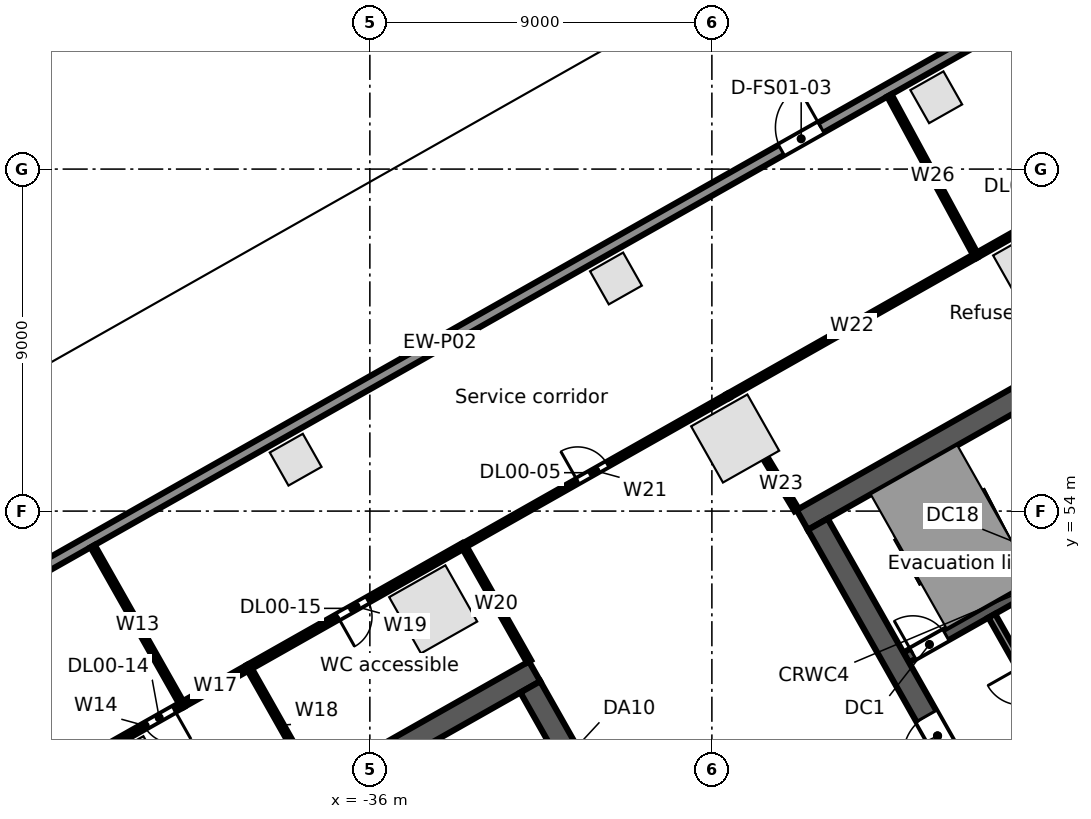
"""IFC4 building model, lengths in metres.
Left out: names, types, materials, properties, quantities, classifications, styles, units other than length and angle.
Written with IfcOpenShell. Run it as: python <this file> out.ifc"""

import sys

from ifc_helpers import new_model, si_unit, direction, frame, frame_2d, origin, origin_2d, place, context, subcontext, project, spatial, rectangle, extrude, element, fill, save


model = new_model("IFC4")
c1 = context("Model", 3, precision=1e-05, world=origin(), true_north=direction((0.0, 1.0)))
c2 = subcontext(c1, "Body", "Model", "MODEL_VIEW")
j1 = project(units=[si_unit("LENGTHUNIT", "METRE"), si_unit("PLANEANGLEUNIT", "RADIAN")], contexts=[c1])
p1 = place(None, origin())
s1 = spatial("IfcSite", under=j1, at=p1, CompositionType="ELEMENT")
p2 = place(p1, origin())
s2 = spatial("IfcBuilding", under=s1, at=p2, CompositionType="ELEMENT")
p3 = place(p2, origin())
s3 = spatial("IfcBuildingStorey", under=s2, at=p3, CompositionType="ELEMENT", Elevation=0.0)
for number, where, z_axis, x_axis in (
    (1, (-18.441, 60.406, 0.0), (0.0, 0.0, 1.0), (-0.87, -0.492, 0.0)),
    (2, (-26.388, 55.91, 0.0), (0.0, 0.0, 1.0), (-0.87, -0.492, 0.0)),
    (3, (-34.334, 51.414, 0.0), (0.0, 0.0, 1.0), (-0.87, -0.492, 0.0)),
    (4, (-42.28, 46.919, 0.0), (0.0, 0.0, 1.0), (-0.87, -0.492, 0.0)),
):
    element("IfcColumn", number, at=place(p3, frame(where, z_axis=z_axis, x_axis=x_axis)), inside=s3, PredefinedType="COLUMN", context=c2, shape_type="SweptSolid", body=[
        extrude(rectangle(XDim=1.7, YDim=1.7, at=origin_2d()), origin(), (0.0, 0.0, 1.0), 6.5),
    ])
for number, where, z_axis, x_axis in (
    (5, (-21.096, 64.89, 0.0), (0.0, 0.0, 1.0), (-0.87, -0.492, 0.0)),
    (6, (-29.524, 60.122, 0.0), (0.0, 0.0, 1.0), (-0.87, -0.492, 0.0)),
    (7, (-37.953, 55.353, 0.0), (0.0, 0.0, 1.0), (-0.87, -0.492, 0.0)),
):
    element("IfcColumn", number, at=place(p3, frame(where, z_axis=z_axis, x_axis=x_axis)), inside=s3, PredefinedType="COLUMN", context=c2, shape_type="SweptSolid", body=[
        extrude(rectangle(XDim=1.0, YDim=1.0, at=origin_2d()), origin(), (0.0, 0.0, 1.0), 6.5),
    ])
p4 = place(p3, frame((-63.707, 41.701, 0.0), z_axis=(0.0, 0.0, 1.0), x_axis=(0.870355510268, 0.492423888277, 0.0)))
e8 = element("IfcWall", 8, at=p4, inside=s3, PredefinedType="STANDARD", context=c2, shape_type="SweptSolid", body=[
    extrude(rectangle(XDim=67.903, YDim=0.3, at=frame_2d((33.952, 0.0))), origin(), (0.0, 0.0, 1.0), 6.15),
])
p5 = place(p4, frame((44.274, 0.0, 0.0)))
e9 = element("IfcOpeningElement", 9, at=p5, cuts=e8, PredefinedType="OPENING", context=c2, shape_type="SweptSolid", body=[
    extrude(rectangle(XDim=1.2, YDim=2.4, at=frame_2d((0.6, 1.2))), frame((0.0, 0.16, 0.0), z_axis=(0.0, -1.0, 0.0), x_axis=(1.0, 0.0, 0.0)), (0.0, 0.0, 1.0), 0.32),
])
p6 = place(p4, frame((15.222, 0.0, 0.0)))
e10 = element("IfcOpeningElement", 10, at=p6, cuts=e8, PredefinedType="OPENING", context=c2, shape_type="SweptSolid", body=[
    extrude(rectangle(XDim=1.2, YDim=2.4, at=frame_2d((0.6, 1.2))), frame((0.0, 0.16, 0.0), z_axis=(0.0, -1.0, 0.0), x_axis=(1.0, 0.0, 0.0)), (0.0, 0.0, 1.0), 0.32),
])
p7 = place(p3, frame((-46.461, 41.412, 0.0), z_axis=(0.0, 0.0, 1.0), x_axis=(0.870350116061, 0.492433422375, 0.0)))
e11 = element("IfcWall", 11, at=p7, inside=s3, PredefinedType="SOLIDWALL", context=c2, shape_type="SweptSolid", body=[
    extrude(rectangle(XDim=17.0, YDim=0.6, at=frame_2d((8.5, 0.0))), origin(), (0.0, 0.0, 1.0), 6.15),
])
p8 = place(p3, frame((-31.778, 49.374, 0.0), z_axis=(0.0, 0.0, 1.0), x_axis=(0.492433046652, -0.870350328641, 0.0)))
e12 = element("IfcWall", 12, at=p8, inside=s3, PredefinedType="SOLIDWALL", context=c2, shape_type="SweptSolid", body=[
    extrude(rectangle(XDim=12.8, YDim=0.6, at=frame_2d((6.4, 0.0))), origin(), (0.0, 0.0, 1.0), 6.15),
])
p9 = place(p8, frame((5.8, 0.0, 0.0)))
e13 = element("IfcOpeningElement", 13, at=p9, cuts=e12, PredefinedType="OPENING", context=c2, shape_type="SweptSolid", body=[
    extrude(rectangle(XDim=1.2, YDim=2.1, at=frame_2d((0.6, 1.05))), frame((0.0, 0.31, 0.0), z_axis=(0.0, -1.0, 0.0), x_axis=(1.0, 0.0, 0.0)), (0.0, 0.0, 1.0), 0.62),
])
p10 = place(p3, frame((-19.718, 46.316, 0.0), z_axis=(0.0, 0.0, 1.0), x_axis=(0.870353963862, 0.492426621528, 0.0)))
e14 = element("IfcWall", 14, at=p10, inside=s3, PredefinedType="SOLIDWALL", context=c2, shape_type="SweptSolid", body=[
    extrude(rectangle(XDim=4.9, YDim=0.3, at=frame_2d((2.45, 0.0))), origin(), (0.0, 0.0, 1.0), 6.15),
])
p11 = place(p10, frame((0.55, 0.0, 0.0)))
e15 = element("IfcOpeningElement", 15, at=p11, cuts=e14, PredefinedType="OPENING", context=c2, shape_type="SweptSolid", body=[
    extrude(rectangle(XDim=1.1, YDim=2.1, at=frame_2d((0.55, 1.05))), frame((0.0, 0.16, 0.0), z_axis=(0.0, -1.0, 0.0), x_axis=(1.0, 0.0, 0.0)), (0.0, 0.0, 1.0), 0.32),
])
p12 = place(p10, frame((2.85, 0.0, 0.0)))
e16 = element("IfcOpeningElement", 16, at=p12, cuts=e14, PredefinedType="OPENING", context=c2, shape_type="SweptSolid", body=[
    extrude(rectangle(XDim=0.9, YDim=2.1, at=frame_2d((0.45, 1.05))), frame((0.0, 0.16, 0.0), z_axis=(0.0, -1.0, 0.0), x_axis=(1.0, 0.0, 0.0)), (0.0, 0.0, 1.0), 0.32),
])
p13 = place(p3, frame((-21.885, 50.146, 0.0), z_axis=(0.0, 0.0, 1.0), x_axis=(0.870359411463, 0.492416992881, 0.0)))
e17 = element("IfcWall", 17, at=p13, inside=s3, PredefinedType="SOLIDWALL", context=c2, shape_type="SweptSolid", body=[
    extrude(rectangle(XDim=7.2, YDim=0.3, at=frame_2d((3.6, 0.0))), origin(), (0.0, 0.0, 1.0), 6.15),
])
p14 = place(p13, frame((0.2, 0.0, 0.0)))
e18 = element("IfcOpeningElement", 18, at=p14, cuts=e17, PredefinedType="OPENING", context=c2, shape_type="SweptSolid", body=[
    extrude(rectangle(XDim=1.0, YDim=2.1, at=frame_2d((0.5, 1.05))), frame((0.0, 0.16, 0.0), z_axis=(0.0, -1.0, 0.0), x_axis=(1.0, 0.0, 0.0)), (0.0, 0.0, 1.0), 0.32),
])
p15 = place(p3, frame((-24.623, 53.767, 0.0), z_axis=(0.0, 0.0, 1.0), x_axis=(0.870356627484, 0.492421913601, 0.0)))
e19 = element("IfcWall", 19, at=p15, inside=s3, PredefinedType="SOLIDWALL", context=c2, shape_type="SweptSolid", body=[
    extrude(rectangle(XDim=15.0, YDim=0.6, at=frame_2d((7.5, 0.0))), origin(), (0.0, 0.0, 1.0), 6.15),
])
p16 = place(p3, frame((-24.214, 53.654, 0.0), z_axis=(0.0, 0.0, 1.0), x_axis=(0.492441221355, -0.870345703448, 0.0)))
e20 = element("IfcWall", 20, at=p16, inside=s3, PredefinedType="SOLIDWALL", context=c2, shape_type="SweptSolid", body=[
    extrude(rectangle(XDim=12.8, YDim=0.6, at=frame_2d((6.4, 0.0))), origin(), (0.0, 0.0, 1.0), 6.15),
])
p17 = place(p16, frame((5.8, 0.0, 0.0)))
e21 = element("IfcOpeningElement", 21, at=p17, cuts=e20, PredefinedType="OPENING", context=c2, shape_type="SweptSolid", body=[
    extrude(rectangle(XDim=1.2, YDim=2.1, at=frame_2d((0.6, 1.05))), frame((0.0, 0.31, 0.0), z_axis=(0.0, -1.0, 0.0), x_axis=(1.0, 0.0, 0.0)), (0.0, 0.0, 1.0), 0.62),
])
p18 = place(p3, frame((-19.635, 51.246, 0.0), z_axis=(0.0, 0.0, 1.0), x_axis=(0.492408451753, -0.87036424366, 0.0)))
e22 = element("IfcWall", 22, at=p18, inside=s3, PredefinedType="PARTITIONING", context=c2, shape_type="SweptSolid", body=[
    extrude(rectangle(XDim=4.1, YDim=0.2, at=frame_2d((2.05, 0.0))), origin(), (0.0, 0.0, 1.0), 6.15),
])
p19 = place(p18, frame((1.55, 0.0, 0.0)))
e23 = element("IfcOpeningElement", 23, at=p19, cuts=e22, PredefinedType="OPENING", context=c2, shape_type="SweptSolid", body=[
    extrude(rectangle(XDim=1.0, YDim=2.1, at=frame_2d((0.5, 1.05))), frame((0.0, 0.11, 0.0), z_axis=(0.0, -1.0, 0.0), x_axis=(1.0, 0.0, 0.0)), (0.0, 0.0, 1.0), 0.22),
])
p20 = place(p3, frame((-43.295, 53.077, 0.0), z_axis=(0.0, 0.0, 1.0), x_axis=(0.492503605136, -0.87031040378, 0.0)))
e24 = element("IfcWall", 24, at=p20, inside=s3, PredefinedType="PARTITIONING", context=c2, shape_type="SweptSolid", body=[
    extrude(rectangle(XDim=4.793, YDim=0.125, at=frame_2d((2.397, 0.0))), origin(), (0.0, 0.0, 1.0), 5.43),
])
p21 = place(p3, frame((-42.892, 47.797, 0.0), z_axis=(0.0, 0.0, 1.0), x_axis=(0.870332332106, 0.492464853254, 0.0)))
e25 = element("IfcWall", 25, at=p21, inside=s3, PredefinedType="PARTITIONING", context=c2, shape_type="SweptSolid", body=[
    extrude(rectangle(XDim=2.25, YDim=0.15, at=frame_2d((1.125, 0.0))), origin(), (0.0, 0.0, 1.0), 6.15),
])
p22 = place(p21, frame((1.1, 0.0, 0.0)))
e26 = element("IfcOpeningElement", 26, at=p22, cuts=e25, PredefinedType="OPENING", context=c2, shape_type="SweptSolid", body=[
    extrude(rectangle(XDim=0.9, YDim=2.1, at=frame_2d((0.45, 1.05))), frame((0.0, 0.085, 0.0), z_axis=(0.0, -1.0, 0.0), x_axis=(1.0, 0.0, 0.0)), (0.0, 0.0, 1.0), 0.17),
])
p23 = place(p3, frame((-40.934, 48.905, 0.0), z_axis=(0.0, 0.0, 1.0), x_axis=(0.870592396556, 0.492004958368, 0.0)))
e27 = element("IfcWall", 27, at=p23, inside=s3, PredefinedType="PARTITIONING", context=c2, shape_type="SweptSolid", body=[
    extrude(rectangle(XDim=2.0, YDim=0.15, at=frame_2d((1.0, 0.0))), origin(), (0.0, 0.0, 1.0), 6.15),
])
p24 = place(p3, frame((-39.193, 49.889, 0.0), z_axis=(0.0, 0.0, 1.0), x_axis=(0.492392845909, -0.87037307248, 0.0)))
e28 = element("IfcWall", 28, at=p24, inside=s3, PredefinedType="PARTITIONING", context=c2, shape_type="SweptSolid", body=[
    extrude(rectangle(XDim=3.5, YDim=0.125, at=frame_2d((1.75, 0.0))), origin(), (0.0, 0.0, 1.0), 5.43),
])
p25 = place(p3, frame((-39.193, 49.889, 0.0), z_axis=(0.0, 0.0, 1.0), x_axis=(0.870324897112, 0.492477992876, 0.0)))
e29 = element("IfcWall", 29, at=p25, inside=s3, PredefinedType="PARTITIONING", context=c2, shape_type="SweptSolid", body=[
    extrude(rectangle(XDim=6.5, YDim=0.15, at=frame_2d((3.25, 0.0))), origin(), (0.0, 0.0, 1.0), 5.53),
])
p26 = place(p25, frame((2.7, 0.0, 0.0)))
e30 = element("IfcOpeningElement", 30, at=p26, cuts=e29, PredefinedType="OPENING", context=c2, shape_type="SweptSolid", body=[
    extrude(rectangle(XDim=0.9, YDim=2.1, at=frame_2d((0.45, 1.05))), frame((0.0, 0.085, 0.0), z_axis=(0.0, -1.0, 0.0), x_axis=(1.0, 0.0, 0.0)), (0.0, 0.0, 1.0), 0.17),
])
p27 = place(p3, frame((-33.536, 53.09, 0.0), z_axis=(0.0, 0.0, 1.0), x_axis=(0.492521469645, -0.870300294116, 0.0)))
e31 = element("IfcWall", 31, at=p27, inside=s3, PredefinedType="PARTITIONING", context=c2, shape_type="SweptSolid", body=[
    extrude(rectangle(XDim=3.5, YDim=0.125, at=frame_2d((1.75, 0.0))), origin(), (0.0, 0.0, 1.0), 5.43),
])
p28 = place(p3, frame((-33.536, 53.09, 0.0), z_axis=(0.0, 0.0, 1.0), x_axis=(0.870327439455, 0.492473499928, 0.0)))
e32 = element("IfcWall", 32, at=p28, inside=s3, PredefinedType="PARTITIONING", context=c2, shape_type="SweptSolid", body=[
    extrude(rectangle(XDim=8.0, YDim=0.125, at=frame_2d((4.0, 0.0))), origin(), (0.0, 0.0, 1.0), 5.212),
])
p29 = place(p28, frame((3.45, 0.0, 0.0)))
e33 = element("IfcOpeningElement", 33, at=p29, cuts=e32, PredefinedType="OPENING", context=c2, shape_type="SweptSolid", body=[
    extrude(rectangle(XDim=0.9, YDim=2.1, at=frame_2d((0.45, 1.05))), frame((0.0, 0.073, 0.0), z_axis=(0.0, -1.0, 0.0), x_axis=(1.0, 0.0, 0.0)), (0.0, 0.0, 1.0), 0.145),
])
p30 = place(p3, frame((-26.573, 57.03, 0.0), z_axis=(0.0, 0.0, 1.0), x_axis=(0.870354792164, 0.492425157519, 0.0)))
e34 = element("IfcWall", 34, at=p30, inside=s3, PredefinedType="PARTITIONING", context=c2, shape_type="SweptSolid", body=[
    extrude(rectangle(XDim=7.499, YDim=0.125, at=frame_2d((3.75, 0.0))), origin(), (0.0, 0.0, 1.0), 6.15),
])
p31 = place(p3, frame((-25.587, 55.387, 0.0), z_axis=(0.0, 0.0, 1.0), x_axis=(0.514767546849, -0.857329792268, 0.0)))
e35 = element("IfcWall", 35, at=p31, inside=s3, PredefinedType="PARTITIONING", context=c2, shape_type="SweptSolid", body=[
    extrude(rectangle(XDim=1.585, YDim=0.125, at=frame_2d((0.792, 0.0))), origin(), (0.0, 0.0, 1.0), 6.15),
])
p32 = place(p3, frame((-22.33, 64.939, 0.0), z_axis=(0.0, 0.0, 1.0), x_axis=(0.476360236723, -0.879250206067, 0.0)))
e36 = element("IfcWall", 36, at=p32, inside=s3, PredefinedType="PARTITIONING", context=c2, shape_type="SweptSolid", body=[
    extrude(rectangle(XDim=4.795, YDim=0.125, at=frame_2d((2.397, 0.0))), origin(), (0.0, 0.0, 1.0), 5.43),
])
p33 = place(p3, frame((-20.046, 60.723, 0.0), z_axis=(0.0, 0.0, 1.0), x_axis=(0.870364520461, 0.492407962489, 0.0)))
e37 = element("IfcWall", 37, at=p33, inside=s3, PredefinedType="PARTITIONING", context=c2, shape_type="SweptSolid", body=[
    extrude(rectangle(XDim=7.5, YDim=0.125, at=frame_2d((3.75, 0.0))), origin(), (0.0, 0.0, 1.0), 5.43),
])
p34 = place(p33, frame((3.2, 0.0, 0.0)))
e38 = element("IfcOpeningElement", 38, at=p34, cuts=e37, PredefinedType="OPENING", context=c2, shape_type="SweptSolid", body=[
    extrude(rectangle(XDim=0.9, YDim=2.1, at=frame_2d((0.45, 1.05))), frame((0.0, 0.073, 0.0), z_axis=(0.0, -1.0, 0.0), x_axis=(1.0, 0.0, 0.0)), (0.0, 0.0, 1.0), 0.145),
])
p35 = place(p5, origin())
e39 = element("IfcDoor", 39, at=p35, inside=s3, OperationType="SINGLE_SWING_RIGHT", PredefinedType="DOOR", context=c2, shape_type="SweptSolid", body=[
    extrude(rectangle(XDim=1.2, YDim=2.4, at=frame_2d((0.6, 1.2))), frame((0.0, 0.025, 0.0), z_axis=(0.0, -1.0, 0.0), x_axis=(1.0, 0.0, 0.0)), (0.0, 0.0, 1.0), 0.05),
])
fill(e9, e39)
p36 = place(p14, origin())
e40 = element("IfcDoor", 40, at=p36, inside=s3, OperationType="SINGLE_SWING_LEFT", PredefinedType="DOOR", context=c2, shape_type="SweptSolid", body=[
    extrude(rectangle(XDim=1.0, YDim=2.1, at=frame_2d((0.5, 1.05))), frame((0.0, 0.025, 0.0), z_axis=(0.0, -1.0, 0.0), x_axis=(1.0, 0.0, 0.0)), (0.0, 0.0, 1.0), 0.05),
])
fill(e18, e40)
p37 = place(p17, frame((1.2, 0.0, 0.0), z_axis=(0.0, 0.0, 1.0), x_axis=(-1.0, 0.0, 0.0)))
e41 = element("IfcDoor", 41, at=p37, inside=s3, OperationType="SINGLE_SWING_LEFT", PredefinedType="DOOR", context=c2, shape_type="SweptSolid", body=[
    extrude(rectangle(XDim=1.2, YDim=2.1, at=frame_2d((0.6, 1.05))), frame((0.0, 0.025, 0.0), z_axis=(0.0, -1.0, 0.0), x_axis=(1.0, 0.0, 0.0)), (0.0, 0.0, 1.0), 0.05),
])
fill(e21, e41)
p38 = place(p29, origin())
e42 = element("IfcDoor", 42, at=p38, inside=s3, OperationType="SINGLE_SWING_LEFT", PredefinedType="DOOR", context=c2, shape_type="SweptSolid", body=[
    extrude(rectangle(XDim=0.9, YDim=2.1, at=frame_2d((0.45, 1.05))), frame((0.0, 0.025, 0.0), z_axis=(0.0, -1.0, 0.0), x_axis=(1.0, 0.0, 0.0)), (0.0, 0.0, 1.0), 0.05),
])
fill(e33, e42)
p39 = place(p22, frame((0.9, 0.0, 0.0), z_axis=(0.0, 0.0, 1.0), x_axis=(-1.0, 0.0, 0.0)))
e43 = element("IfcDoor", 43, at=p39, inside=s3, OperationType="SINGLE_SWING_LEFT", PredefinedType="DOOR", context=c2, shape_type="SweptSolid", body=[
    extrude(rectangle(XDim=0.9, YDim=2.1, at=frame_2d((0.45, 1.05))), frame((0.0, 0.025, 0.0), z_axis=(0.0, -1.0, 0.0), x_axis=(1.0, 0.0, 0.0)), (0.0, 0.0, 1.0), 0.05),
])
fill(e26, e43)
p40 = place(p26, frame((0.9, 0.0, 0.0), z_axis=(0.0, 0.0, 1.0), x_axis=(-1.0, 0.0, 0.0)))
e44 = element("IfcDoor", 44, at=p40, inside=s3, OperationType="SINGLE_SWING_RIGHT", PredefinedType="DOOR", context=c2, shape_type="SweptSolid", body=[
    extrude(rectangle(XDim=0.9, YDim=2.1, at=frame_2d((0.45, 1.05))), frame((0.0, 0.025, 0.0), z_axis=(0.0, -1.0, 0.0), x_axis=(1.0, 0.0, 0.0)), (0.0, 0.0, 1.0), 0.05),
])
fill(e30, e44)
save(model, sys.argv[1])
